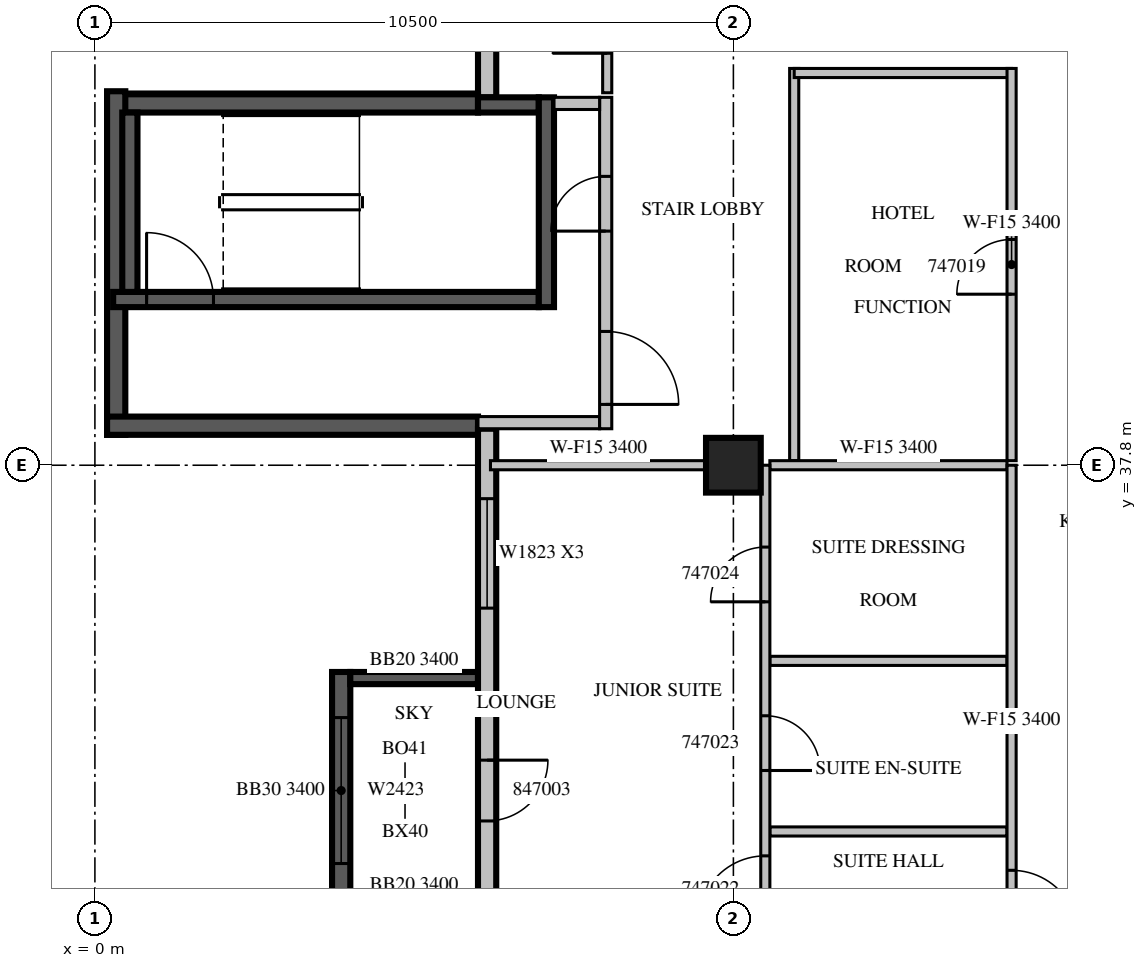
"""IFC4 building model, lengths in metres.
Left out: names, types, materials, properties, quantities, classifications, styles, units other than length and angle.
Written with IfcOpenShell. Run it as: python <this file> out.ifc"""

import sys

from ifc_helpers import new_model, si_unit, direction, frame, frame_2d, origin, origin_2d, place, context, subcontext, project, spatial, rectangle, extrude, source, transform, mapped, element, fill, save


model = new_model("IFC4")
c1 = context("Model", 3, precision=1e-05, world=origin(), true_north=direction((0.0, 1.0)))
c2 = subcontext(c1, "Body", "Model", "MODEL_VIEW")
j1 = project(units=[si_unit("LENGTHUNIT", "METRE"), si_unit("PLANEANGLEUNIT", "RADIAN")], contexts=[c1])
p1 = place(None, origin())
s1 = spatial("IfcSite", under=j1, at=p1, CompositionType="ELEMENT")
p2 = place(p1, origin())
s2 = spatial("IfcBuilding", under=s1, at=p2, CompositionType="ELEMENT")
p3 = place(p2, frame((0.0, 0.0, 212.0)))
s3 = spatial("IfcBuildingStorey", under=s2, at=p3, CompositionType="ELEMENT", Elevation=212.0)
m1 = source(origin(), c2, "Body", "SweptSolid", [
    extrude(rectangle(XDim=0.9, YDim=0.9, at=origin_2d()), origin(), (0.0, 0.0, 1.0), 3.8),
])
p4 = place(p3, frame((10.5, 37.8, 0.0), z_axis=(0.0, 0.0, 1.0), x_axis=(1.0, 0.0, 0.0)))
e1 = element("IfcColumn", 1, at=p4, inside=s3, PredefinedType="COLUMN", context=c2, shape_type="MappedRepresentation", body=[
    mapped(m1, transform((0.0, 0.0, 0.0), scale=1.0)),
])
m2 = source(origin(), c2, "Body", "SweptSolid", [
    extrude(rectangle(XDim=3.9, YDim=0.3, at=frame_2d((1.95, 0.0))), origin(), (0.0, 0.0, 1.0), 3.4),
])
p5 = place(p3, frame((4.05, 34.4, 0.0), z_axis=(0.0, 0.0, 1.0), x_axis=(0.0, -1.0, 0.0)))
e2 = element("IfcWall", 2, at=p5, inside=s3, PredefinedType="SOLIDWALL", context=c2, shape_type="MappedRepresentation", body=[
    mapped(m2, transform((0.0, 0.0, 0.0), scale=1.0)),
])
m3 = source(origin(), c2, "Body", "SweptSolid", [
    extrude(rectangle(XDim=2.4, YDim=2.3, at=frame_2d((1.2, 1.15))), frame((0.0, 0.16, 0.0), z_axis=(0.0, -1.0, 0.0), x_axis=(1.0, 0.0, 0.0)), (0.0, 0.0, 1.0), 0.32),
])
p6 = place(p5, frame((0.75, 0.0, 0.6)))
e3 = element("IfcOpeningElement", 3, at=p6, cuts=e2, PredefinedType="OPENING", context=c2, shape_type="MappedRepresentation", body=[
    mapped(m3, transform((0.0, 0.0, 0.0), scale=1.0)),
])
m4 = source(origin(), c2, "Body", "SweptSolid", [
    extrude(rectangle(XDim=2.1, YDim=0.2, at=frame_2d((1.05, 0.0))), origin(), (0.0, 0.0, 1.0), 3.4),
])
p7 = place(p3, frame((6.3, 34.3, 0.0), z_axis=(0.0, 0.0, 1.0), x_axis=(-1.0, 0.0, 0.0)))
e4 = element("IfcWall", 4, at=p7, inside=s3, PredefinedType="SOLIDWALL", context=c2, shape_type="MappedRepresentation", body=[
    mapped(m4, transform((0.0, 0.0, 0.0), scale=1.0)),
])
m5 = source(origin(), c2, "Body", "SweptSolid", [
    extrude(rectangle(XDim=9.91, YDim=0.3, at=frame_2d((4.955, 0.0))), origin(), (0.0, 0.0, 1.0), 3.4),
])
p8 = place(p3, frame((6.45, 53.76, 0.0), z_axis=(0.0, 0.0, 1.0), x_axis=(0.0, -1.0, 0.0)))
e5 = element("IfcWall", 5, at=p8, inside=s3, PredefinedType="STANDARD", context=c2, shape_type="MappedRepresentation", body=[
    mapped(m5, transform((0.0, 0.0, 0.0), scale=1.0)),
])
m6 = source(origin(), c2, "Body", "SweptSolid", [
    extrude(rectangle(XDim=3.6, YDim=2.3, at=frame_2d((1.8, 1.15))), frame((0.0, 0.16, 0.0), z_axis=(0.0, -1.0, 0.0), x_axis=(1.0, 0.0, 0.0)), (0.0, 0.0, 1.0), 0.32),
])
p9 = place(p8, frame((3.39, 0.0, 0.6)))
e6 = element("IfcOpeningElement", 6, at=p9, cuts=e5, PredefinedType="OPENING", context=c2, shape_type="MappedRepresentation", body=[
    mapped(m6, transform((0.0, 0.0, 0.0), scale=1.0)),
])
p10 = place(p8, frame((0.495, 0.0, 0.6)))
e7 = element("IfcOpeningElement", 7, at=p10, cuts=e5, PredefinedType="OPENING", context=c2, shape_type="MappedRepresentation", body=[
    mapped(m3, transform((0.0, 0.0, 0.0), scale=1.0)),
])
m7 = source(origin(), c2, "Body", "SweptSolid", [
    extrude(rectangle(XDim=6.1, YDim=0.3, at=frame_2d((3.05, 0.0))), origin(), (0.0, 0.0, 1.0), 3.4),
])
p11 = place(p3, frame((6.3, 43.75, 0.0), z_axis=(0.0, 0.0, 1.0), x_axis=(-1.0, 0.0, 0.0)))
e8 = element("IfcWall", 8, at=p11, inside=s3, PredefinedType="SOLIDWALL", context=c2, shape_type="MappedRepresentation", body=[
    mapped(m7, transform((0.0, 0.0, 0.0), scale=1.0)),
])
m8 = source(origin(), c2, "Body", "SweptSolid", [
    extrude(rectangle(XDim=5.65, YDim=0.3, at=frame_2d((2.825, 0.0))), origin(), (0.0, 0.0, 1.0), 3.4),
])
p12 = place(p3, frame((0.35, 43.95, 0.0), z_axis=(0.0, 0.0, 1.0), x_axis=(0.0, -1.0, 0.0)))
e9 = element("IfcWall", 9, at=p12, inside=s3, PredefinedType="SOLIDWALL", context=c2, shape_type="MappedRepresentation", body=[
    mapped(m8, transform((0.0, 0.0, 0.0), scale=1.0)),
])
p13 = place(p3, frame((0.2, 38.45, 0.0), z_axis=(0.0, 0.0, 1.0), x_axis=(1.0, 0.0, 0.0)))
e10 = element("IfcWall", 10, at=p13, inside=s3, PredefinedType="SOLIDWALL", context=c2, shape_type="MappedRepresentation", body=[
    mapped(m7, transform((0.0, 0.0, 0.0), scale=1.0)),
])
m9 = source(origin(), c2, "Body", "SweptSolid", [
    extrude(rectangle(XDim=16.6, YDim=0.3, at=frame_2d((8.3, 0.0))), origin(), (0.0, 0.0, 1.0), 3.4),
])
p14 = place(p3, frame((6.45, 38.4, 0.0), z_axis=(0.0, 0.0, 1.0), x_axis=(0.0, -1.0, 0.0)))
e11 = element("IfcWall", 11, at=p14, inside=s3, PredefinedType="STANDARD", context=c2, shape_type="MappedRepresentation", body=[
    mapped(m9, transform((0.0, 0.0, 0.0), scale=1.0)),
])
m10 = source(origin(), c2, "Body", "SweptSolid", [
    extrude(rectangle(XDim=1.8, YDim=2.3, at=frame_2d((0.9, 1.15))), frame((0.0, 0.16, 0.0), z_axis=(0.0, -1.0, 0.0), x_axis=(1.0, 0.0, 0.0)), (0.0, 0.0, 1.0), 0.32),
])
p15 = place(p14, frame((1.15, 0.0, 0.6)))
e12 = element("IfcOpeningElement", 12, at=p15, cuts=e11, PredefinedType="OPENING", context=c2, shape_type="MappedRepresentation", body=[
    mapped(m10, transform((0.0, 0.0, 0.0), scale=1.0)),
])
p16 = place(p14, frame((9.438, 0.0, 0.6)))
e13 = element("IfcOpeningElement", 13, at=p16, cuts=e11, PredefinedType="OPENING", context=c2, shape_type="MappedRepresentation", body=[
    mapped(m10, transform((0.0, 0.0, 0.0), scale=1.0)),
])
m11 = source(origin(), c2, "Body", "SweptSolid", [
    extrude(rectangle(XDim=1.2, YDim=2.3, at=frame_2d((0.6, 1.15))), frame((0.0, 0.16, 0.0), z_axis=(0.0, -1.0, 0.0), x_axis=(1.0, 0.0, 0.0)), (0.0, 0.0, 1.0), 0.32),
])
p17 = place(p14, frame((14.338, 0.0, 0.6)))
e14 = element("IfcOpeningElement", 14, at=p17, cuts=e11, PredefinedType="OPENING", context=c2, shape_type="MappedRepresentation", body=[
    mapped(m11, transform((0.0, 0.0, 0.0), scale=1.0)),
])
p18 = place(p14, frame((11.887, 0.0, 0.6)))
e15 = element("IfcOpeningElement", 15, at=p18, cuts=e11, PredefinedType="OPENING", context=c2, shape_type="MappedRepresentation", body=[
    mapped(m10, transform((0.0, 0.0, 0.0), scale=1.0)),
])
m12 = source(origin(), c2, "Body", "SweptSolid", [
    extrude(rectangle(XDim=1.0, YDim=2.1, at=frame_2d((0.5, 1.05))), frame((0.0, 0.16, 0.0), z_axis=(0.0, -1.0, 0.0), x_axis=(1.0, 0.0, 0.0)), (0.0, 0.0, 1.0), 0.32),
])
p19 = place(p14, frame((5.45, 0.0, 0.0)))
e16 = element("IfcOpeningElement", 16, at=p19, cuts=e11, PredefinedType="OPENING", context=c2, shape_type="MappedRepresentation", body=[
    mapped(m12, transform((0.0, 0.0, 0.0), scale=1.0)),
])
m13 = source(origin(), c2, "Body", "SweptSolid", [
    extrude(rectangle(XDim=7.0, YDim=0.25, at=frame_2d((3.5, 0.0))), origin(), (0.0, 0.0, 1.0), 3.4),
])
p20 = place(p3, frame((0.3, 40.525, 0.0), z_axis=(0.0, 0.0, 1.0), x_axis=(1.0, 0.0, 0.0)))
e17 = element("IfcWall", 17, at=p20, inside=s3, PredefinedType="SOLIDWALL", context=c2, shape_type="MappedRepresentation", body=[
    mapped(m13, transform((0.0, 0.0, 0.0), scale=1.0)),
])
m14 = source(origin(), c2, "Body", "SweptSolid", [
    extrude(rectangle(XDim=1.1, YDim=2.1, at=frame_2d((0.55, 1.05))), frame((0.0, 0.135, 0.0), z_axis=(0.0, -1.0, 0.0), x_axis=(1.0, 0.0, 0.0)), (0.0, 0.0, 1.0), 0.27),
])
p21 = place(p20, frame((0.55, 0.0, 0.0)))
e18 = element("IfcOpeningElement", 18, at=p21, cuts=e17, PredefinedType="OPENING", context=c2, shape_type="MappedRepresentation", body=[
    mapped(m14, transform((0.0, 0.0, 0.0), scale=1.0)),
])
m15 = source(origin(), c2, "Body", "SweptSolid", [
    extrude(rectangle(XDim=1.0, YDim=0.25, at=frame_2d((0.5, 0.0))), origin(), (0.0, 0.0, 1.0), 3.4),
])
p22 = place(p3, frame((6.3, 43.725, 0.0), z_axis=(0.0, 0.0, 1.0), x_axis=(1.0, 0.0, 0.0)))
e19 = element("IfcWall", 19, at=p22, inside=s3, PredefinedType="SOLIDWALL", context=c2, shape_type="MappedRepresentation", body=[
    mapped(m15, transform((0.0, 0.0, 0.0), scale=1.0)),
])
m16 = source(origin(), c2, "Body", "SweptSolid", [
    extrude(rectangle(XDim=3.45, YDim=0.25, at=frame_2d((1.725, 0.0))), origin(), (0.0, 0.0, 1.0), 3.4),
])
p23 = place(p3, frame((7.425, 40.4, 0.0), z_axis=(0.0, 0.0, 1.0), x_axis=(0.0, 1.0, 0.0)))
e20 = element("IfcWall", 20, at=p23, inside=s3, PredefinedType="SOLIDWALL", context=c2, shape_type="MappedRepresentation", body=[
    mapped(m16, transform((0.0, 0.0, 0.0), scale=1.0)),
])
m17 = source(origin(), c2, "Body", "SweptSolid", [
    extrude(rectangle(XDim=2.95, YDim=0.25, at=frame_2d((1.475, 0.0))), origin(), (0.0, 0.0, 1.0), 3.4),
])
p24 = place(p3, frame((0.575, 40.65, 0.0), z_axis=(0.0, 0.0, 1.0), x_axis=(0.0, 1.0, 0.0)))
e21 = element("IfcWall", 21, at=p24, inside=s3, PredefinedType="SOLIDWALL", context=c2, shape_type="MappedRepresentation", body=[
    mapped(m17, transform((0.0, 0.0, 0.0), scale=1.0)),
])
m18 = source(origin(), c2, "Body", "SweptSolid", [
    extrude(rectangle(XDim=2.0, YDim=0.2, at=frame_2d((1.0, 0.0))), origin(), (0.0, 0.0, 1.0), 3.4),
])
p25 = place(p3, frame((6.3, 38.5, 0.0), z_axis=(0.0, 0.0, 1.0), x_axis=(1.0, 0.0, 0.0)))
e22 = element("IfcWall", 22, at=p25, inside=s3, PredefinedType="PARTITIONING", context=c2, shape_type="MappedRepresentation", body=[
    mapped(m18, transform((0.0, 0.0, 0.0), scale=1.0)),
])
m19 = source(origin(), c2, "Body", "SweptSolid", [
    extrude(rectangle(XDim=5.45, YDim=0.2, at=frame_2d((2.725, 0.0))), origin(), (0.0, 0.0, 1.0), 3.4),
])
p26 = place(p3, frame((8.4, 38.4, 0.0), z_axis=(0.0, 0.0, 1.0), x_axis=(0.0, 1.0, 0.0)))
e23 = element("IfcWall", 23, at=p26, inside=s3, PredefinedType="PARTITIONING", context=c2, shape_type="MappedRepresentation", body=[
    mapped(m19, transform((0.0, 0.0, 0.0), scale=1.0)),
])
m20 = source(origin(), c2, "Body", "SweptSolid", [
    extrude(rectangle(XDim=1.2, YDim=2.1, at=frame_2d((0.6, 1.05))), frame((0.0, 0.11, 0.0), z_axis=(0.0, -1.0, 0.0), x_axis=(1.0, 0.0, 0.0)), (0.0, 0.0, 1.0), 0.22),
])
p27 = place(p26, frame((0.4, 0.0, 0.0)))
e24 = element("IfcOpeningElement", 24, at=p27, cuts=e23, PredefinedType="OPENING", context=c2, shape_type="MappedRepresentation", body=[
    mapped(m20, transform((0.0, 0.0, 0.0), scale=1.0)),
])
m21 = source(origin(), c2, "Body", "SweptSolid", [
    extrude(rectangle(XDim=0.9, YDim=2.1, at=frame_2d((0.45, 1.05))), frame((0.0, 0.11, 0.0), z_axis=(0.0, -1.0, 0.0), x_axis=(1.0, 0.0, 0.0)), (0.0, 0.0, 1.0), 0.22),
])
p28 = place(p26, frame((3.25, 0.0, 0.0)))
e25 = element("IfcOpeningElement", 25, at=p28, cuts=e23, PredefinedType="OPENING", context=c2, shape_type="MappedRepresentation", body=[
    mapped(m21, transform((0.0, 0.0, 0.0), scale=1.0)),
])
m22 = source(origin(), c2, "Body", "SweptSolid", [
    extrude(rectangle(XDim=0.75, YDim=0.2, at=frame_2d((0.375, 0.0))), origin(), (0.0, 0.0, 1.0), 3.4),
])
p29 = place(p3, frame((7.55, 43.75, 0.0), z_axis=(0.0, 0.0, 1.0), x_axis=(1.0, 0.0, 0.0)))
e26 = element("IfcWall", 26, at=p29, inside=s3, PredefinedType="PARTITIONING", context=c2, shape_type="MappedRepresentation", body=[
    mapped(m22, transform((0.0, 0.0, 0.0), scale=1.0)),
])
m23 = source(origin(), c2, "Body", "SweptSolid", [
    extrude(rectangle(XDim=6.45, YDim=0.15, at=frame_2d((3.225, 0.0))), origin(), (0.0, 0.0, 1.0), 3.4),
])
p30 = place(p3, frame((11.5, 44.325, 0.0), z_axis=(0.0, 0.0, 1.0), x_axis=(0.0, -1.0, 0.0)))
e27 = element("IfcWall", 27, at=p30, inside=s3, PredefinedType="PARTITIONING", context=c2, shape_type="MappedRepresentation", body=[
    mapped(m23, transform((0.0, 0.0, 0.0), scale=1.0)),
])
m24 = source(origin(), c2, "Body", "SweptSolid", [
    extrude(rectangle(XDim=3.575, YDim=0.15, at=frame_2d((1.788, 0.0))), origin(), (0.0, 0.0, 1.0), 3.4),
])
p31 = place(p3, frame((15.075, 44.25, 0.0), z_axis=(0.0, 0.0, 1.0), x_axis=(-1.0, 0.0, 0.0)))
e28 = element("IfcWall", 28, at=p31, inside=s3, PredefinedType="PARTITIONING", context=c2, shape_type="MappedRepresentation", body=[
    mapped(m24, transform((0.0, 0.0, 0.0), scale=1.0)),
])
p32 = place(p3, frame((15.075, 37.875, 0.0), z_axis=(0.0, 0.0, 1.0), x_axis=(0.0, 1.0, 0.0)))
e29 = element("IfcWall", 29, at=p32, inside=s3, PredefinedType="PARTITIONING", context=c2, shape_type="MappedRepresentation", body=[
    mapped(m23, transform((0.0, 0.0, 0.0), scale=1.0)),
])
m25 = source(origin(), c2, "Body", "SweptSolid", [
    extrude(rectangle(XDim=0.9, YDim=2.1, at=frame_2d((0.45, 1.05))), frame((0.0, 0.085, 0.0), z_axis=(0.0, -1.0, 0.0), x_axis=(1.0, 0.0, 0.0)), (0.0, 0.0, 1.0), 0.17),
])
p33 = place(p32, frame((2.737, 0.0, 0.0)))
e30 = element("IfcOpeningElement", 30, at=p33, cuts=e29, PredefinedType="OPENING", context=c2, shape_type="MappedRepresentation", body=[
    mapped(m25, transform((0.0, 0.0, 0.0), scale=1.0)),
])
m26 = source(origin(), c2, "Body", "SweptSolid", [
    extrude(rectangle(XDim=2.2, YDim=0.15, at=frame_2d((1.1, 0.0))), origin(), (0.0, 0.0, 1.0), 3.4),
])
p34 = place(p3, frame((8.425, 43.925, 0.0), z_axis=(0.0, 0.0, 1.0), x_axis=(0.0, 1.0, 0.0)))
e31 = element("IfcWall", 31, at=p34, inside=s3, PredefinedType="PARTITIONING", context=c2, shape_type="MappedRepresentation", body=[
    mapped(m26, transform((0.0, 0.0, 0.0), scale=1.0)),
])
p35 = place(p34, frame((0.65, 0.0, 0.0)))
e32 = element("IfcOpeningElement", 32, at=p35, cuts=e31, PredefinedType="OPENING", context=c2, shape_type="MappedRepresentation", body=[
    mapped(m25, transform((0.0, 0.0, 0.0), scale=1.0)),
])
m27 = source(origin(), c2, "Body", "SweptSolid", [
    extrude(rectangle(XDim=3.9, YDim=0.15, at=frame_2d((1.95, 0.0))), origin(), (0.0, 0.0, 1.0), 3.4),
])
for number, where, z_axis, x_axis in (
    (33, (15.0, 31.777, 0.0), (0.0, 0.0, 1.0), (-1.0, 0.0, 0.0)),
    (34, (15.0, 34.583, 0.0), (0.0, 0.0, 1.0), (-1.0, 0.0, 0.0)),
):
    element("IfcWall", number, at=place(p3, frame(where, z_axis=z_axis, x_axis=x_axis)), inside=s3, PredefinedType="PARTITIONING", context=c2, shape_type="MappedRepresentation", body=[
        mapped(m27, transform((0.0, 0.0, 0.0), scale=1.0)),
    ])
m28 = source(origin(), c2, "Body", "SweptSolid", [
    extrude(rectangle(XDim=3.546, YDim=0.15, at=frame_2d((1.773, 0.0))), origin(), (0.0, 0.0, 1.0), 3.4),
])
p36 = place(p3, frame((10.051, 37.8, 0.0), z_axis=(0.0, 0.0, 1.0), x_axis=(-1.0, 0.0, 0.0)))
e35 = element("IfcWall", 35, at=p36, inside=s3, PredefinedType="PARTITIONING", context=c2, shape_type="MappedRepresentation", body=[
    mapped(m28, transform((0.0, 0.0, 0.0), scale=1.0)),
])
p37 = place(p3, frame((15.0, 37.8, 0.0), z_axis=(0.0, 0.0, 1.0), x_axis=(-1.0, 0.0, 0.0)))
e36 = element("IfcWall", 36, at=p37, inside=s3, PredefinedType="PARTITIONING", context=c2, shape_type="MappedRepresentation", body=[
    mapped(m27, transform((0.0, 0.0, 0.0), scale=1.0)),
])
m29 = source(origin(), c2, "Body", "SweptSolid", [
    extrude(rectangle(XDim=8.4, YDim=0.15, at=frame_2d((4.2, 0.0))), origin(), (0.0, 0.0, 1.0), 3.4),
])
p38 = place(p3, frame((11.025, 29.4, 0.0), z_axis=(0.0, 0.0, 1.0), x_axis=(0.0, 1.0, 0.0)))
e37 = element("IfcWall", 37, at=p38, inside=s3, PredefinedType="PARTITIONING", context=c2, shape_type="MappedRepresentation", body=[
    mapped(m29, transform((0.0, 0.0, 0.0), scale=1.0)),
])
m30 = source(origin(), c2, "Body", "SweptSolid", [
    extrude(rectangle(XDim=1.1, YDim=2.1, at=frame_2d((0.55, 1.05))), frame((0.0, 0.085, 0.0), z_axis=(0.0, -1.0, 0.0), x_axis=(1.0, 0.0, 0.0)), (0.0, 0.0, 1.0), 0.17),
])
p39 = place(p38, frame((0.876, 0.0, 0.0)))
e38 = element("IfcOpeningElement", 38, at=p39, cuts=e37, PredefinedType="OPENING", context=c2, shape_type="MappedRepresentation", body=[
    mapped(m30, transform((0.0, 0.0, 0.0), scale=1.0)),
])
p40 = place(p38, frame((3.38, 0.0, 0.0)))
e39 = element("IfcOpeningElement", 39, at=p40, cuts=e37, PredefinedType="OPENING", context=c2, shape_type="MappedRepresentation", body=[
    mapped(m25, transform((0.0, 0.0, 0.0), scale=1.0)),
])
p41 = place(p38, frame((6.154, 0.0, 0.0)))
e40 = element("IfcOpeningElement", 40, at=p41, cuts=e37, PredefinedType="OPENING", context=c2, shape_type="MappedRepresentation", body=[
    mapped(m25, transform((0.0, 0.0, 0.0), scale=1.0)),
])
p42 = place(p3, frame((15.075, 29.4, 0.0), z_axis=(0.0, 0.0, 1.0), x_axis=(0.0, 1.0, 0.0)))
e41 = element("IfcWall", 41, at=p42, inside=s3, PredefinedType="PARTITIONING", context=c2, shape_type="MappedRepresentation", body=[
    mapped(m29, transform((0.0, 0.0, 0.0), scale=1.0)),
])
p43 = place(p42, frame((0.638, 0.0, 0.0)))
e42 = element("IfcOpeningElement", 42, at=p43, cuts=e41, PredefinedType="OPENING", context=c2, shape_type="MappedRepresentation", body=[
    mapped(m30, transform((0.0, 0.0, 0.0), scale=1.0)),
])
m31 = source(origin(), c2, "Body", "SweptSolid", [
    extrude(rectangle(XDim=2.4, YDim=2.3, at=frame_2d((1.2, 1.15))), frame((0.0, 0.03, 0.0), z_axis=(0.0, -1.0, 0.0), x_axis=(1.0, 0.0, 0.0)), (0.0, 0.0, 1.0), 0.06),
])
p44 = place(p6, origin())
e43 = element("IfcWindow", 43, at=p44, inside=s3, PartitioningType="SINGLE_PANEL", PredefinedType="WINDOW", context=c2, shape_type="MappedRepresentation", body=[
    mapped(m31, transform((0.0, 0.0, 0.0), scale=1.0)),
])
fill(e3, e43)
m32 = source(origin(), c2, "Body", "SweptSolid", [
    extrude(rectangle(XDim=1.8, YDim=2.3, at=frame_2d((0.9, 1.15))), frame((0.0, 0.03, 0.0), z_axis=(0.0, -1.0, 0.0), x_axis=(1.0, 0.0, 0.0)), (0.0, 0.0, 1.0), 0.06),
])
p45 = place(p15, origin())
e44 = element("IfcWindow", 44, at=p45, inside=s3, PartitioningType="SINGLE_PANEL", PredefinedType="WINDOW", context=c2, shape_type="MappedRepresentation", body=[
    mapped(m32, transform((0.0, 0.0, 0.0), scale=1.0)),
])
fill(e12, e44)
m33 = source(origin(), c2, "Body", "SweptSolid", [
    extrude(rectangle(XDim=1.1, YDim=2.1, at=frame_2d((0.55, 1.05))), frame((0.0, 0.025, 0.0), z_axis=(0.0, -1.0, 0.0), x_axis=(1.0, 0.0, 0.0)), (0.0, 0.0, 1.0), 0.05),
])
p46 = place(p21, origin())
e45 = element("IfcDoor", 45, at=p46, inside=s3, OperationType="SINGLE_SWING_LEFT", PredefinedType="DOOR", context=c2, shape_type="MappedRepresentation", body=[
    mapped(m33, transform((0.0, 0.0, 0.0), scale=1.0)),
])
fill(e18, e45)
m34 = source(origin(), c2, "Body", "SweptSolid", [
    extrude(rectangle(XDim=1.2, YDim=2.1, at=frame_2d((0.6, 1.05))), frame((0.0, 0.025, 0.0), z_axis=(0.0, -1.0, 0.0), x_axis=(1.0, 0.0, 0.0)), (0.0, 0.0, 1.0), 0.05),
])
p47 = place(p27, origin())
e46 = element("IfcDoor", 46, at=p47, inside=s3, OperationType="SINGLE_SWING_RIGHT", PredefinedType="DOOR", context=c2, shape_type="MappedRepresentation", body=[
    mapped(m34, transform((0.0, 0.0, 0.0), scale=1.0)),
])
fill(e24, e46)
m35 = source(origin(), c2, "Body", "SweptSolid", [
    extrude(rectangle(XDim=0.9, YDim=2.1, at=frame_2d((0.45, 1.05))), frame((0.0, 0.025, 0.0), z_axis=(0.0, -1.0, 0.0), x_axis=(1.0, 0.0, 0.0)), (0.0, 0.0, 1.0), 0.05),
])
p48 = place(p28, origin())
e47 = element("IfcDoor", 47, at=p48, inside=s3, OperationType="SINGLE_SWING_LEFT", PredefinedType="DOOR", context=c2, shape_type="MappedRepresentation", body=[
    mapped(m35, transform((0.0, 0.0, 0.0), scale=1.0)),
])
fill(e25, e47)
p49 = place(p33, origin())
e48 = element("IfcDoor", 48, at=p49, inside=s3, OperationType="SINGLE_SWING_LEFT", PredefinedType="DOOR", context=c2, shape_type="MappedRepresentation", body=[
    mapped(m35, transform((0.0, 0.0, 0.0), scale=1.0)),
])
fill(e30, e48)
p50 = place(p35, origin())
e49 = element("IfcDoor", 49, at=p50, inside=s3, OperationType="SINGLE_SWING_LEFT", PredefinedType="DOOR", context=c2, shape_type="MappedRepresentation", body=[
    mapped(m35, transform((0.0, 0.0, 0.0), scale=1.0)),
])
fill(e32, e49)
p51 = place(p43, origin())
e50 = element("IfcDoor", 50, at=p51, inside=s3, OperationType="SINGLE_SWING_RIGHT", PredefinedType="DOOR", context=c2, shape_type="MappedRepresentation", body=[
    mapped(m33, transform((0.0, 0.0, 0.0), scale=1.0)),
])
fill(e42, e50)
p52 = place(p39, origin())
e51 = element("IfcDoor", 51, at=p52, inside=s3, OperationType="SINGLE_SWING_LEFT", PredefinedType="DOOR", context=c2, shape_type="MappedRepresentation", body=[
    mapped(m33, transform((0.0, 0.0, 0.0), scale=1.0)),
])
fill(e38, e51)
p53 = place(p40, origin())
e52 = element("IfcDoor", 52, at=p53, inside=s3, OperationType="SINGLE_SWING_RIGHT", PredefinedType="DOOR", context=c2, shape_type="MappedRepresentation", body=[
    mapped(m35, transform((0.0, 0.0, 0.0), scale=1.0)),
])
fill(e39, e52)
p54 = place(p41, origin())
e53 = element("IfcDoor", 53, at=p54, inside=s3, OperationType="SINGLE_SWING_LEFT", PredefinedType="DOOR", context=c2, shape_type="MappedRepresentation", body=[
    mapped(m35, transform((0.0, 0.0, 0.0), scale=1.0)),
])
fill(e40, e53)
m36 = source(origin(), c2, "Body", "SweptSolid", [
    extrude(rectangle(XDim=1.0, YDim=2.1, at=frame_2d((0.5, 1.05))), frame((0.0, 0.025, 0.0), z_axis=(0.0, -1.0, 0.0), x_axis=(1.0, 0.0, 0.0)), (0.0, 0.0, 1.0), 0.05),
])
p55 = place(p19, origin())
e54 = element("IfcDoor", 54, at=p55, inside=s3, OperationType="SINGLE_SWING_LEFT", PredefinedType="DOOR", context=c2, shape_type="MappedRepresentation", body=[
    mapped(m36, transform((0.0, 0.0, 0.0), scale=1.0)),
])
fill(e16, e54)
save(model, sys.argv[1])
